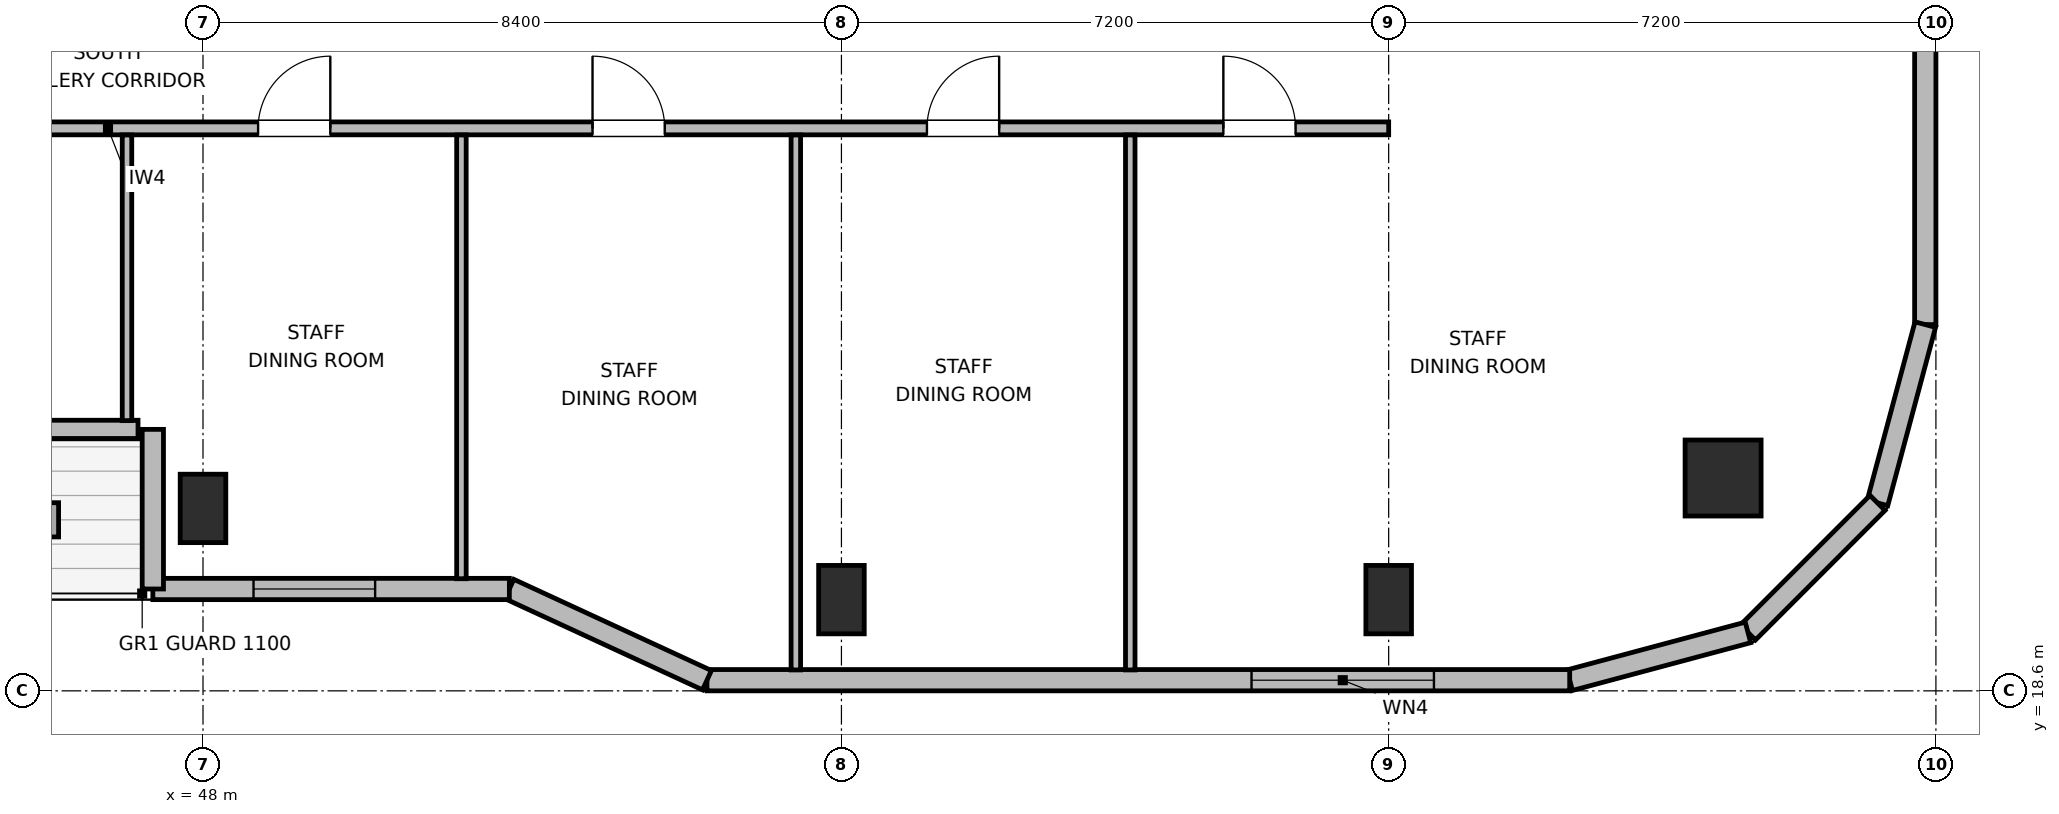
"""IFC4 building model, lengths in metres.
Left out: names, types, materials, properties, quantities, classifications, styles, units other than length and angle.
Written with IfcOpenShell. Run it as: python <this file> out.ifc"""

import sys

from ifc_helpers import new_model, si_unit, direction, frame, frame_2d, origin, origin_2d, place, context, subcontext, project, spatial, rectangle, circle, extrude, element, fill, save


model = new_model("IFC4")
c1 = context("Model", 3, precision=1e-05, world=origin(), true_north=direction((0.0, 1.0)))
c2 = subcontext(c1, "Body", "Model", "MODEL_VIEW")
j1 = project(units=[si_unit("LENGTHUNIT", "METRE"), si_unit("PLANEANGLEUNIT", "RADIAN")], contexts=[c1])
p1 = place(None, origin())
s1 = spatial("IfcSite", under=j1, at=p1, CompositionType="ELEMENT")
p2 = place(p1, origin())
s2 = spatial("IfcBuilding", under=s1, at=p2, CompositionType="ELEMENT")
p3 = place(p2, frame((0.0, 0.0, 302.4)))
s3 = spatial("IfcBuildingStorey", under=s2, at=p3, CompositionType="ELEMENT", Elevation=302.4)
p4 = place(p3, frame((68.0, 21.4, 0.0), z_axis=(0.0, 0.0, 1.0), x_axis=(1.0, 0.0, 0.0)))
e1 = element("IfcColumn", 1, at=p4, inside=s3, PredefinedType="COLUMN", context=c2, shape_type="SweptSolid", body=[
    extrude(circle(Radius=0.5, at=origin_2d()), origin(), (0.0, 0.0, 1.0), 3.9),
])
for number, where, z_axis, x_axis in (
    (2, (48.0, 21.0, 0.0), (0.0, 0.0, 1.0), (1.0, 0.0, 0.0)),
    (3, (56.4, 19.8, 0.0), (0.0, 0.0, 1.0), (1.0, 0.0, 0.0)),
    (4, (63.6, 19.8, 0.0), (0.0, 0.0, 1.0), (1.0, 0.0, 0.0)),
):
    element("IfcColumn", number, at=place(p3, frame(where, z_axis=z_axis, x_axis=x_axis)), inside=s3, PredefinedType="COLUMN", context=c2, shape_type="SweptSolid", body=[
        extrude(rectangle(XDim=0.6, YDim=0.9, at=origin_2d()), origin(), (0.0, 0.0, 1.0), 3.9),
    ])
p5 = place(p3, frame((70.66, 37.66, 0.0), z_axis=(0.0, 0.0, 1.0), x_axis=(0.0, -1.0, 0.0)))
e5 = element("IfcWall", 5, at=p5, inside=s3, PredefinedType="SOLIDWALL", context=c2, shape_type="SweptSolid", body=[
    extrude(rectangle(XDim=14.241, YDim=0.28, at=frame_2d((7.121, 0.0))), origin(), (0.0, 0.0, 1.0), 3.68),
])
p6 = place(p5, frame((8.456, 0.0, 0.85)))
e6 = element("IfcOpeningElement", 6, at=p6, cuts=e5, PredefinedType="OPENING", context=c2, shape_type="SweptSolid", body=[
    extrude(rectangle(XDim=1.6, YDim=1.0, at=frame_2d((0.8, 0.5))), frame((0.0, 0.15, 0.0), z_axis=(0.0, -1.0, 0.0), x_axis=(1.0, 0.0, 0.0)), (0.0, 0.0, 1.0), 0.3),
])
p7 = place(p3, frame((70.66, 23.418, 0.0), z_axis=(0.0, 0.0, 1.0), x_axis=(-0.258751159445, -0.965944013639, 0.0)))
e7 = element("IfcWall", 7, at=p7, inside=s3, PredefinedType="SOLIDWALL", context=c2, shape_type="SweptSolid", body=[
    extrude(rectangle(XDim=2.429, YDim=0.28, at=frame_2d((1.214, 0.0))), origin(), (0.0, 0.0, 1.0), 3.68),
])
p8 = place(p3, frame((70.031, 21.073, 0.0), z_axis=(0.0, 0.0, 1.0), x_axis=(-0.707106781187, -0.707106781187, 0.0)))
e8 = element("IfcWall", 8, at=p8, inside=s3, PredefinedType="SOLIDWALL", context=c2, shape_type="SweptSolid", body=[
    extrude(rectangle(XDim=2.41, YDim=0.28, at=frame_2d((1.205, 0.0))), origin(), (0.0, 0.0, 1.0), 3.68),
])
p9 = place(p3, frame((68.327, 19.368, 0.0), z_axis=(0.0, 0.0, 1.0), x_axis=(-0.965937282298, -0.25877628691, 0.0)))
e9 = element("IfcWall", 9, at=p9, inside=s3, PredefinedType="SOLIDWALL", context=c2, shape_type="SweptSolid", body=[
    extrude(rectangle(XDim=2.428, YDim=0.28, at=frame_2d((1.214, 0.0))), origin(), (0.0, 0.0, 1.0), 3.68),
])
p10 = place(p3, frame((65.982, 18.74, 0.0), z_axis=(0.0, 0.0, 1.0), x_axis=(-1.0, 0.0, 0.0)))
e10 = element("IfcWall", 10, at=p10, inside=s3, PredefinedType="SOLIDWALL", context=c2, shape_type="SweptSolid", body=[
    extrude(rectangle(XDim=11.351, YDim=0.28, at=frame_2d((5.676, 0.0))), origin(), (0.0, 0.0, 1.0), 3.68),
])
p11 = place(p10, frame((1.786, 0.0, 0.85)))
e11 = element("IfcOpeningElement", 11, at=p11, cuts=e10, PredefinedType="OPENING", context=c2, shape_type="SweptSolid", body=[
    extrude(rectangle(XDim=2.4, YDim=1.15, at=frame_2d((1.2, 0.575))), frame((0.0, 0.15, 0.0), z_axis=(0.0, -1.0, 0.0), x_axis=(1.0, 0.0, 0.0)), (0.0, 0.0, 1.0), 0.3),
])
p12 = place(p3, frame((54.631, 18.74, 0.0), z_axis=(0.0, 0.0, 1.0), x_axis=(-0.907956889006, 0.419063584324, 0.0)))
e12 = element("IfcWall", 12, at=p12, inside=s3, PredefinedType="SOLIDWALL", context=c2, shape_type="SweptSolid", body=[
    extrude(rectangle(XDim=2.864, YDim=0.28, at=frame_2d((1.432, 0.0))), origin(), (0.0, 0.0, 1.0), 2.265),
])
p13 = place(p3, frame((52.031, 19.94, 0.0), z_axis=(0.0, 0.0, 1.0), x_axis=(-1.0, 0.0, 0.0)))
e13 = element("IfcWall", 13, at=p13, inside=s3, PredefinedType="SOLIDWALL", context=c2, shape_type="SweptSolid", body=[
    extrude(rectangle(XDim=4.691, YDim=0.28, at=frame_2d((2.345, 0.0))), origin(), (0.0, 0.0, 1.0), 2.265),
])
p14 = place(p13, frame((1.766, 0.0, 0.85)))
e14 = element("IfcOpeningElement", 14, at=p14, cuts=e13, PredefinedType="OPENING", context=c2, shape_type="SweptSolid", body=[
    extrude(rectangle(XDim=1.6, YDim=1.0, at=frame_2d((0.8, 0.5))), frame((0.0, 0.15, 0.0), z_axis=(0.0, -1.0, 0.0), x_axis=(1.0, 0.0, 0.0)), (0.0, 0.0, 1.0), 0.3),
])
p15 = place(p3, frame((47.34, 19.94, 0.0), z_axis=(0.0, 0.0, 1.0), x_axis=(0.0, 1.0, 0.0)))
e15 = element("IfcWall", 15, at=p15, inside=s3, PredefinedType="SOLIDWALL", context=c2, shape_type="SweptSolid", body=[
    extrude(rectangle(XDim=2.1, YDim=0.28, at=frame_2d((1.05, 0.0))), origin(), (0.0, 0.0, 1.0), 2.265),
])
p16 = place(p3, frame((47.145, 22.04, 0.0), z_axis=(0.0, 0.0, 1.0), x_axis=(-1.0, 0.0, 0.0)))
e16 = element("IfcWall", 16, at=p16, inside=s3, PredefinedType="SOLIDWALL", context=c2, shape_type="SweptSolid", body=[
    extrude(rectangle(XDim=4.49, YDim=0.24, at=frame_2d((2.245, 0.0))), origin(), (0.0, 0.0, 1.0), 3.68),
])
p17 = place(p16, frame((1.745, 0.0, 0.0)))
e17 = element("IfcOpeningElement", 17, at=p17, cuts=e16, PredefinedType="OPENING", context=c2, shape_type="SweptSolid", body=[
    extrude(rectangle(XDim=1.0, YDim=2.02, at=frame_2d((0.5, 1.01))), frame((0.0, 0.13, 0.0), z_axis=(0.0, -1.0, 0.0), x_axis=(1.0, 0.0, 0.0)), (0.0, 0.0, 1.0), 0.26),
])
p18 = place(p3, frame((30.725, 26.0, 0.0), z_axis=(0.0, 0.0, 1.0), x_axis=(1.0, 0.0, 0.0)))
e18 = element("IfcWall", 18, at=p18, inside=s3, PredefinedType="PARTITIONING", context=c2, shape_type="SweptSolid", body=[
    extrude(rectangle(XDim=32.875, YDim=0.17, at=frame_2d((16.438, 0.0))), origin(), (0.0, 0.0, 1.0), 3.68),
])
p19 = place(p18, frame((1.362, 0.0, 0.0)))
e19 = element("IfcOpeningElement", 19, at=p19, cuts=e18, PredefinedType="OPENING", context=c2, shape_type="SweptSolid", body=[
    extrude(rectangle(XDim=0.95, YDim=2.04, at=frame_2d((0.475, 1.02))), frame((0.0, 0.095, 0.0), z_axis=(0.0, -1.0, 0.0), x_axis=(1.0, 0.0, 0.0)), (0.0, 0.0, 1.0), 0.19),
])
p20 = place(p18, frame((5.0, 0.0, 0.0)))
e20 = element("IfcOpeningElement", 20, at=p20, cuts=e18, PredefinedType="OPENING", context=c2, shape_type="SweptSolid", body=[
    extrude(rectangle(XDim=0.95, YDim=2.04, at=frame_2d((0.475, 1.02))), frame((0.0, 0.095, 0.0), z_axis=(0.0, -1.0, 0.0), x_axis=(1.0, 0.0, 0.0)), (0.0, 0.0, 1.0), 0.19),
])
p21 = place(p18, frame((8.6, 0.0, 0.0)))
e21 = element("IfcOpeningElement", 21, at=p21, cuts=e18, PredefinedType="OPENING", context=c2, shape_type="SweptSolid", body=[
    extrude(rectangle(XDim=0.95, YDim=2.04, at=frame_2d((0.475, 1.02))), frame((0.0, 0.095, 0.0), z_axis=(0.0, -1.0, 0.0), x_axis=(1.0, 0.0, 0.0)), (0.0, 0.0, 1.0), 0.19),
])
p22 = place(p18, frame((13.1, 0.0, 0.0)))
e22 = element("IfcOpeningElement", 22, at=p22, cuts=e18, PredefinedType="OPENING", context=c2, shape_type="SweptSolid", body=[
    extrude(rectangle(XDim=0.95, YDim=2.04, at=frame_2d((0.475, 1.02))), frame((0.0, 0.095, 0.0), z_axis=(0.0, -1.0, 0.0), x_axis=(1.0, 0.0, 0.0)), (0.0, 0.0, 1.0), 0.19),
])
p23 = place(p18, frame((18.0, 0.0, 0.0)))
e23 = element("IfcOpeningElement", 23, at=p23, cuts=e18, PredefinedType="OPENING", context=c2, shape_type="SweptSolid", body=[
    extrude(rectangle(XDim=0.95, YDim=2.04, at=frame_2d((0.475, 1.02))), frame((0.0, 0.095, 0.0), z_axis=(0.0, -1.0, 0.0), x_axis=(1.0, 0.0, 0.0)), (0.0, 0.0, 1.0), 0.19),
])
p24 = place(p18, frame((22.4, 0.0, 0.0)))
e24 = element("IfcOpeningElement", 24, at=p24, cuts=e18, PredefinedType="OPENING", context=c2, shape_type="SweptSolid", body=[
    extrude(rectangle(XDim=0.95, YDim=2.04, at=frame_2d((0.475, 1.02))), frame((0.0, 0.095, 0.0), z_axis=(0.0, -1.0, 0.0), x_axis=(1.0, 0.0, 0.0)), (0.0, 0.0, 1.0), 0.19),
])
p25 = place(p18, frame((26.8, 0.0, 0.0)))
e25 = element("IfcOpeningElement", 25, at=p25, cuts=e18, PredefinedType="OPENING", context=c2, shape_type="SweptSolid", body=[
    extrude(rectangle(XDim=0.95, YDim=2.04, at=frame_2d((0.475, 1.02))), frame((0.0, 0.095, 0.0), z_axis=(0.0, -1.0, 0.0), x_axis=(1.0, 0.0, 0.0)), (0.0, 0.0, 1.0), 0.19),
])
p26 = place(p18, frame((30.7, 0.0, 0.0)))
e26 = element("IfcOpeningElement", 26, at=p26, cuts=e18, PredefinedType="OPENING", context=c2, shape_type="SweptSolid", body=[
    extrude(rectangle(XDim=0.95, YDim=2.04, at=frame_2d((0.475, 1.02))), frame((0.0, 0.095, 0.0), z_axis=(0.0, -1.0, 0.0), x_axis=(1.0, 0.0, 0.0)), (0.0, 0.0, 1.0), 0.19),
])
p27 = place(p3, frame((47.0, 22.155, 0.0), z_axis=(0.0, 0.0, 1.0), x_axis=(0.0, 1.0, 0.0)))
e27 = element("IfcWall", 27, at=p27, inside=s3, PredefinedType="PARTITIONING", context=c2, shape_type="SweptSolid", body=[
    extrude(rectangle(XDim=3.758, YDim=0.125, at=frame_2d((1.879, 0.0))), origin(), (0.0, 0.0, 1.0), 3.68),
])
p28 = place(p3, frame((51.4, 20.075, 0.0), z_axis=(0.0, 0.0, 1.0), x_axis=(0.0, 1.0, 0.0)))
e28 = element("IfcWall", 28, at=p28, inside=s3, PredefinedType="PARTITIONING", context=c2, shape_type="SweptSolid", body=[
    extrude(rectangle(XDim=5.838, YDim=0.125, at=frame_2d((2.919, 0.0))), origin(), (0.0, 0.0, 1.0), 3.68),
])
p29 = place(p3, frame((55.8, 18.875, 0.0), z_axis=(0.0, 0.0, 1.0), x_axis=(0.0, 1.0, 0.0)))
e29 = element("IfcWall", 29, at=p29, inside=s3, PredefinedType="PARTITIONING", context=c2, shape_type="SweptSolid", body=[
    extrude(rectangle(XDim=7.038, YDim=0.125, at=frame_2d((3.519, 0.0))), origin(), (0.0, 0.0, 1.0), 3.043),
])
p30 = place(p3, frame((60.2, 18.875, 0.0), z_axis=(0.0, 0.0, 1.0), x_axis=(0.0, 1.0, 0.0)))
e30 = element("IfcWall", 30, at=p30, inside=s3, PredefinedType="PARTITIONING", context=c2, shape_type="SweptSolid", body=[
    extrude(rectangle(XDim=7.038, YDim=0.125, at=frame_2d((3.519, 0.0))), origin(), (0.0, 0.0, 1.0), 3.68),
])
p31 = place(p11, origin())
e31 = element("IfcWindow", 31, at=p31, inside=s3, PartitioningType="SINGLE_PANEL", PredefinedType="WINDOW", context=c2, shape_type="SweptSolid", body=[
    extrude(rectangle(XDim=2.4, YDim=1.15, at=frame_2d((1.2, 0.575))), frame((0.0, 0.03, 0.0), z_axis=(0.0, -1.0, 0.0), x_axis=(1.0, 0.0, 0.0)), (0.0, 0.0, 1.0), 0.06),
])
fill(e11, e31)
p32 = place(p14, origin())
e32 = element("IfcWindow", 32, at=p32, inside=s3, PartitioningType="SINGLE_PANEL", PredefinedType="WINDOW", context=c2, shape_type="SweptSolid", body=[
    extrude(rectangle(XDim=1.6, YDim=1.0, at=frame_2d((0.8, 0.5))), frame((0.0, 0.03, 0.0), z_axis=(0.0, -1.0, 0.0), x_axis=(1.0, 0.0, 0.0)), (0.0, 0.0, 1.0), 0.06),
])
fill(e14, e32)
p33 = place(p23, origin())
e33 = element("IfcDoor", 33, at=p33, inside=s3, OperationType="SINGLE_SWING_RIGHT", PredefinedType="DOOR", context=c2, shape_type="SweptSolid", body=[
    extrude(rectangle(XDim=0.95, YDim=2.04, at=frame_2d((0.475, 1.02))), frame((0.0, 0.025, 0.0), z_axis=(0.0, -1.0, 0.0), x_axis=(1.0, 0.0, 0.0)), (0.0, 0.0, 1.0), 0.05),
])
fill(e23, e33)
p34 = place(p24, origin())
e34 = element("IfcDoor", 34, at=p34, inside=s3, OperationType="SINGLE_SWING_LEFT", PredefinedType="DOOR", context=c2, shape_type="SweptSolid", body=[
    extrude(rectangle(XDim=0.95, YDim=2.04, at=frame_2d((0.475, 1.02))), frame((0.0, 0.025, 0.0), z_axis=(0.0, -1.0, 0.0), x_axis=(1.0, 0.0, 0.0)), (0.0, 0.0, 1.0), 0.05),
])
fill(e24, e34)
p35 = place(p25, origin())
e35 = element("IfcDoor", 35, at=p35, inside=s3, OperationType="SINGLE_SWING_RIGHT", PredefinedType="DOOR", context=c2, shape_type="SweptSolid", body=[
    extrude(rectangle(XDim=0.95, YDim=2.04, at=frame_2d((0.475, 1.02))), frame((0.0, 0.025, 0.0), z_axis=(0.0, -1.0, 0.0), x_axis=(1.0, 0.0, 0.0)), (0.0, 0.0, 1.0), 0.05),
])
fill(e25, e35)
p36 = place(p26, origin())
e36 = element("IfcDoor", 36, at=p36, inside=s3, OperationType="SINGLE_SWING_LEFT", PredefinedType="DOOR", context=c2, shape_type="SweptSolid", body=[
    extrude(rectangle(XDim=0.95, YDim=2.04, at=frame_2d((0.475, 1.02))), frame((0.0, 0.025, 0.0), z_axis=(0.0, -1.0, 0.0), x_axis=(1.0, 0.0, 0.0)), (0.0, 0.0, 1.0), 0.05),
])
fill(e26, e36)
save(model, sys.argv[1])
